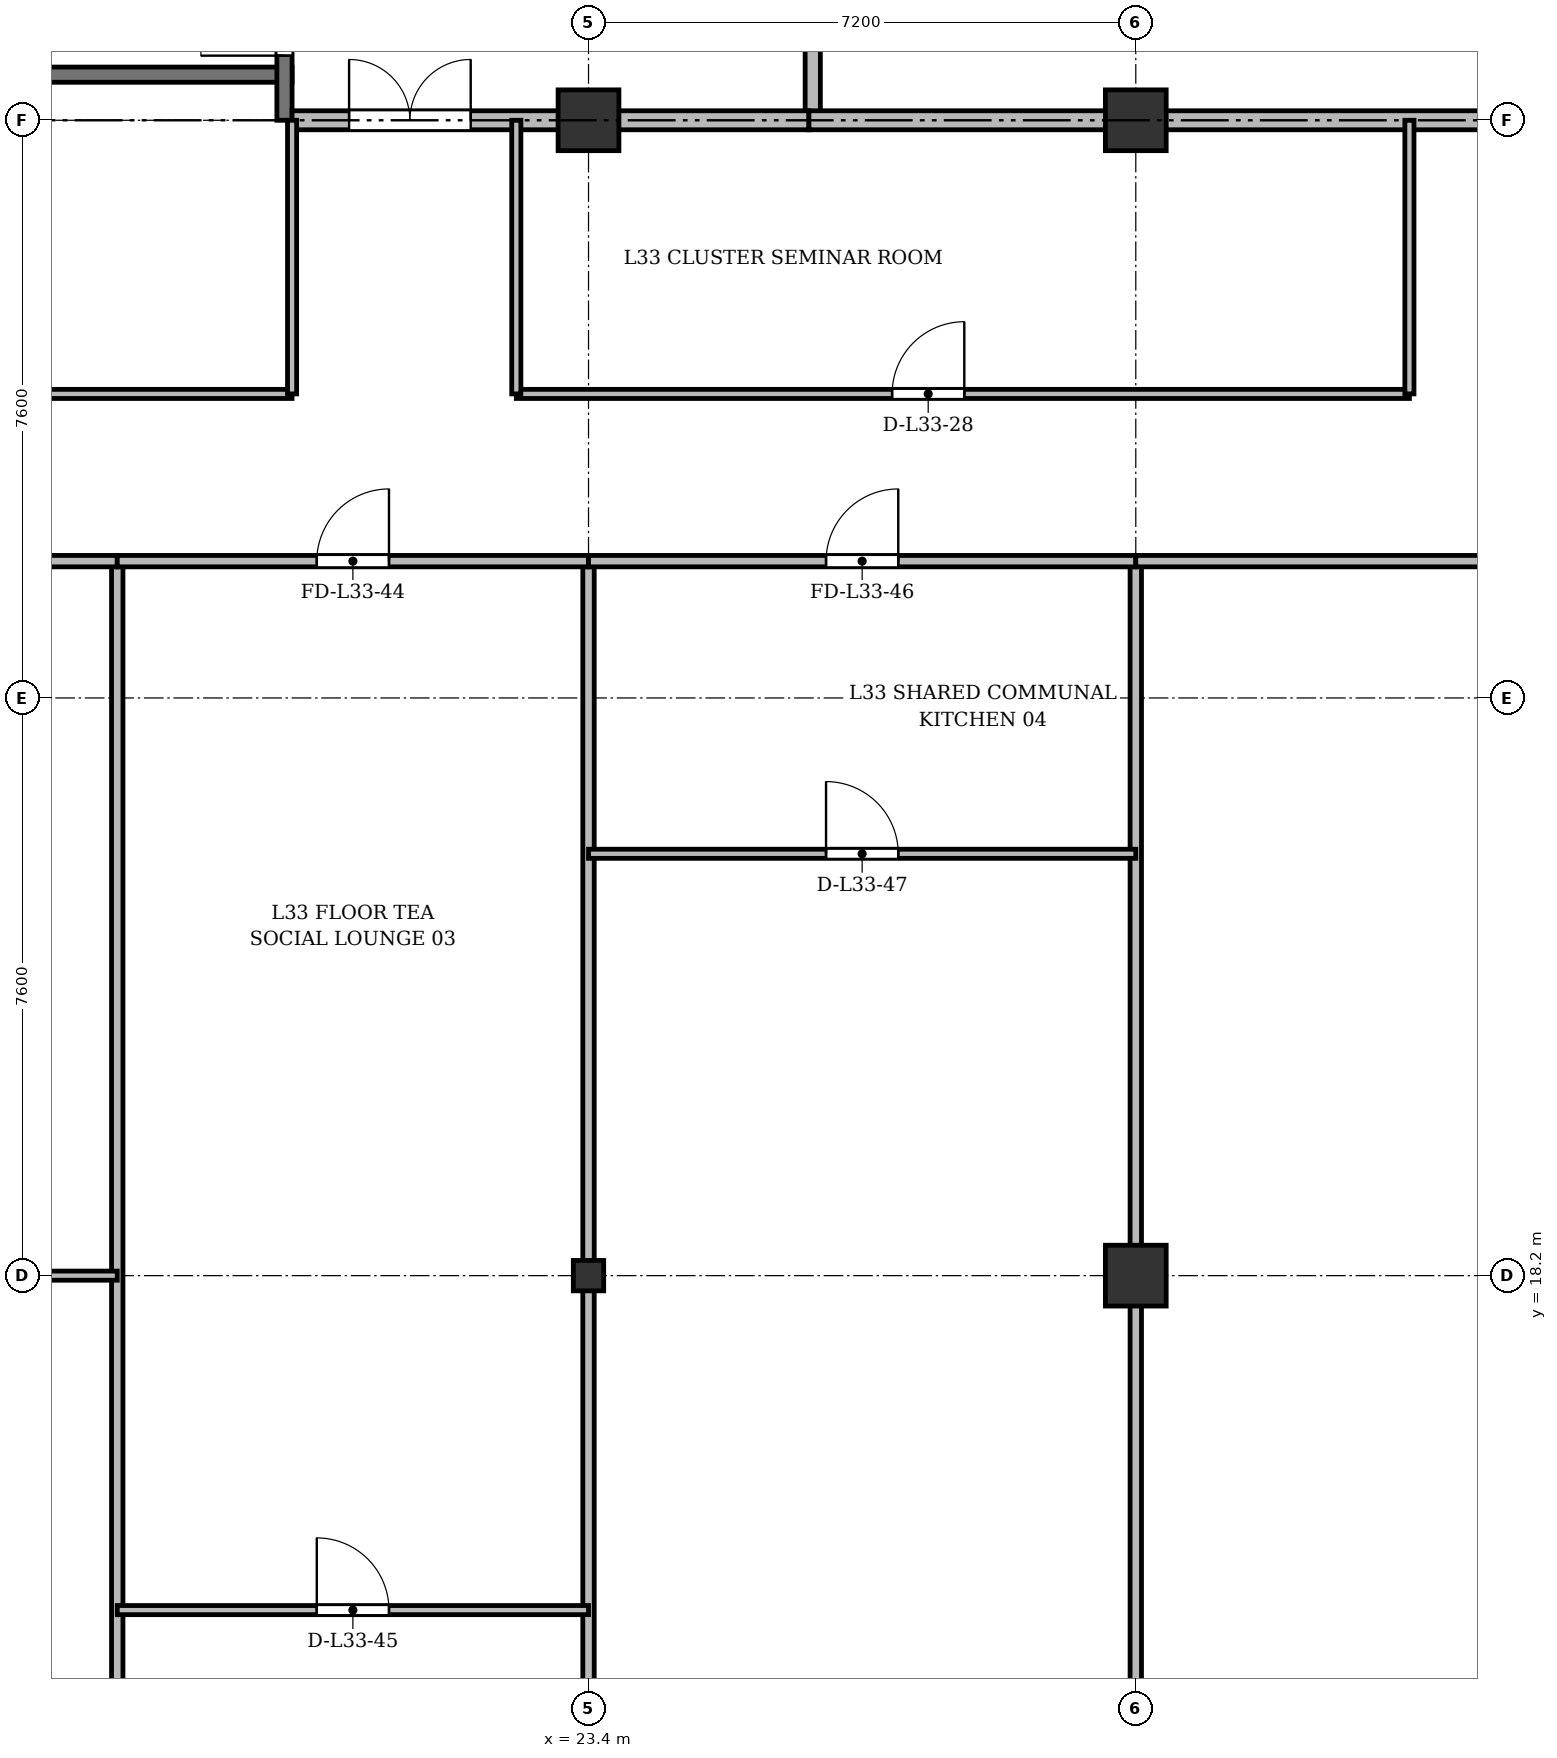
"""IFC4 building model, lengths in metres.
Left out: names, types, materials, properties, quantities, classifications, styles, units other than length and angle.
Written with IfcOpenShell. Run it as: python <this file> out.ifc"""

import sys

from ifc_helpers import new_model, si_unit, direction, frame, frame_2d, origin, origin_2d, place, context, subcontext, project, spatial, rectangle, i_section, extrude, source, transform, mapped, element, fill, save


model = new_model("IFC4")
c1 = context("Model", 3, precision=1e-05, world=origin(), true_north=direction((0.0, 1.0)))
c2 = subcontext(c1, "Body", "Model", "MODEL_VIEW")
j1 = project(units=[si_unit("LENGTHUNIT", "METRE"), si_unit("PLANEANGLEUNIT", "RADIAN")], contexts=[c1])
p1 = place(None, origin())
s1 = spatial("IfcSite", under=j1, at=p1, CompositionType="ELEMENT")
p2 = place(p1, origin())
s2 = spatial("IfcBuilding", under=s1, at=p2, CompositionType="ELEMENT")
p3 = place(p2, frame((0.0, 0.0, 128.5)))
s3 = spatial("IfcBuildingStorey", under=s2, at=p3, CompositionType="ELEMENT", Elevation=128.5)
m1 = source(origin(), c2, "Body", "SweptSolid", [
    extrude(i_section(OverallWidth=0.4, OverallDepth=0.4, WebThickness=0.022, FlangeThickness=0.035, at=origin_2d()), origin(), (0.0, 0.0, 1.0), 3.6),
])
p4 = place(p3, frame((23.4, 18.2, 0.0), z_axis=(0.0, 0.0, 1.0), x_axis=(1.0, 0.0, 0.0)))
e1 = element("IfcColumn", 1, at=p4, inside=s3, PredefinedType="COLUMN", context=c2, shape_type="MappedRepresentation", body=[
    mapped(m1, transform((0.0, 0.0, 0.0), x_axis=(1.0, 0.0, 0.0), y_axis=(0.0, 1.0, 0.0), z_axis=(0.0, 0.0, 1.0), scale=1.0)),
])
m2 = source(origin(), c2, "Body", "SweptSolid", [
    extrude(rectangle(XDim=0.8, YDim=0.8, at=origin_2d()), origin(), (0.0, 0.0, 1.0), 3.6),
])
for number, where, z_axis, x_axis in (
    (2, (23.4, 33.4, 0.0), (0.0, 0.0, 1.0), (1.0, 0.0, 0.0)),
    (3, (30.6, 18.2, 0.0), (0.0, 0.0, 1.0), (1.0, 0.0, 0.0)),
    (4, (30.6, 33.4, 0.0), (0.0, 0.0, 1.0), (1.0, 0.0, 0.0)),
):
    element("IfcColumn", number, at=place(p3, frame(where, z_axis=z_axis, x_axis=x_axis)), inside=s3, PredefinedType="COLUMN", context=c2, shape_type="MappedRepresentation", body=[
        mapped(m2, transform((0.0, 0.0, 0.0), x_axis=(1.0, 0.0, 0.0), y_axis=(0.0, 1.0, 0.0), z_axis=(0.0, 0.0, 1.0), scale=1.0)),
    ])
p5 = place(p3, frame((16.1, 34.0, 0.0), z_axis=(0.0, 0.0, 1.0), x_axis=(1.0, 0.0, 0.0)))
e5 = element("IfcWall", 5, at=p5, inside=s3, PredefinedType="SHEAR", context=c2, shape_type="SweptSolid", body=[
    extrude(rectangle(XDim=3.4, YDim=0.2, at=frame_2d((1.7, 0.0))), origin(), (0.0, 0.0, 1.0), 3.22),
])
p6 = place(p3, frame((19.4, 33.4, 0.0), z_axis=(0.0, 0.0, 1.0), x_axis=(0.0, 1.0, 0.0)))
e6 = element("IfcWall", 6, at=p6, inside=s3, PredefinedType="SHEAR", context=c2, shape_type="SweptSolid", body=[
    extrude(rectangle(XDim=11.1, YDim=0.2, at=frame_2d((5.55, 0.0))), origin(), (0.0, 0.0, 1.0), 3.22),
])
p7 = place(p6, frame((0.85, 0.0, 0.0)))
e7 = element("IfcOpeningElement", 7, at=p7, cuts=e6, PredefinedType="OPENING", context=c2, shape_type="SweptSolid", body=[
    extrude(rectangle(XDim=1.1, YDim=2.15, at=frame_2d((0.55, 1.075))), frame((0.0, 0.11, 0.0), z_axis=(0.0, -1.0, 0.0), x_axis=(1.0, 0.0, 0.0)), (0.0, 0.0, 1.0), 0.22),
])
p8 = place(p3, frame((26.35, 33.4, 0.0), z_axis=(0.0, 0.0, 1.0), x_axis=(0.0, 1.0, 0.0)))
e8 = element("IfcWall", 8, at=p8, inside=s3, PredefinedType="SOLIDWALL", context=c2, shape_type="SweptSolid", body=[
    extrude(rectangle(XDim=11.3, YDim=0.2, at=frame_2d((5.65, 0.0))), origin(), (0.0, 0.0, 1.0), 2.632),
])
p9 = place(p3, frame((19.5, 33.4, 0.0), z_axis=(0.0, 0.0, 1.0), x_axis=(1.0, 0.0, 0.0)))
e9 = element("IfcWall", 9, at=p9, inside=s3, PredefinedType="PARTITIONING", context=c2, shape_type="SweptSolid", body=[
    extrude(rectangle(XDim=6.8, YDim=0.25, at=frame_2d((3.4, 0.0))), origin(), (0.0, 0.0, 1.0), 2.632),
])
p10 = place(p9, frame((0.75, 0.0, 0.0)))
e10 = element("IfcOpeningElement", 10, at=p10, cuts=e9, PredefinedType="OPENING", context=c2, shape_type="SweptSolid", body=[
    extrude(rectangle(XDim=1.6, YDim=2.2, at=frame_2d((0.8, 1.1))), frame((0.0, 0.135, 0.0), z_axis=(0.0, -1.0, 0.0), x_axis=(1.0, 0.0, 0.0)), (0.0, 0.0, 1.0), 0.27),
])
p11 = place(p3, frame((26.3, 33.4, 0.0), z_axis=(0.0, 0.0, 1.0), x_axis=(1.0, 0.0, 0.0)))
e11 = element("IfcWall", 11, at=p11, inside=s3, PredefinedType="PARTITIONING", context=c2, shape_type="SweptSolid", body=[
    extrude(rectangle(XDim=20.85, YDim=0.25, at=frame_2d((10.425, 0.0))), origin(), (0.0, 0.0, 1.0), 2.632),
])
p12 = place(p11, frame((9.2, 0.0, 0.0)))
e12 = element("IfcOpeningElement", 12, at=p12, cuts=e11, PredefinedType="OPENING", context=c2, shape_type="SweptSolid", body=[
    extrude(rectangle(XDim=1.6, YDim=2.2, at=frame_2d((0.8, 1.1))), frame((0.0, 0.135, 0.0), z_axis=(0.0, -1.0, 0.0), x_axis=(1.0, 0.0, 0.0)), (0.0, 0.0, 1.0), 0.27),
])
p13 = place(p3, frame((4.75, 29.8, 0.0), z_axis=(0.0, 0.0, 1.0), x_axis=(1.0, 0.0, 0.0)))
e13 = element("IfcWall", 13, at=p13, inside=s3, PredefinedType="PARTITIONING", context=c2, shape_type="SweptSolid", body=[
    extrude(rectangle(XDim=14.75, YDim=0.12, at=frame_2d((7.375, 0.0))), origin(), (0.0, 0.0, 1.0), 2.72),
])
p14 = place(p13, frame((6.9, 0.0, 0.0)))
e14 = element("IfcOpeningElement", 14, at=p14, cuts=e13, PredefinedType="OPENING", context=c2, shape_type="SweptSolid", body=[
    extrude(rectangle(XDim=0.95, YDim=2.15, at=frame_2d((0.475, 1.075))), frame((0.0, 0.07, 0.0), z_axis=(0.0, -1.0, 0.0), x_axis=(1.0, 0.0, 0.0)), (0.0, 0.0, 1.0), 0.14),
])
p15 = place(p3, frame((22.45, 29.8, 0.0), z_axis=(0.0, 0.0, 1.0), x_axis=(1.0, 0.0, 0.0)))
e15 = element("IfcWall", 15, at=p15, inside=s3, PredefinedType="PARTITIONING", context=c2, shape_type="SweptSolid", body=[
    extrude(rectangle(XDim=11.75, YDim=0.12, at=frame_2d((5.875, 0.0))), origin(), (0.0, 0.0, 1.0), 2.72),
])
p16 = place(p15, frame((4.944, 0.0, 0.0)))
e16 = element("IfcOpeningElement", 16, at=p16, cuts=e15, PredefinedType="OPENING", context=c2, shape_type="SweptSolid", body=[
    extrude(rectangle(XDim=0.95, YDim=2.15, at=frame_2d((0.475, 1.075))), frame((0.0, 0.07, 0.0), z_axis=(0.0, -1.0, 0.0), x_axis=(1.0, 0.0, 0.0)), (0.0, 0.0, 1.0), 0.14),
])
for number, where, z_axis, x_axis in (
    (17, (19.5, 29.8, 0.0), (0.0, 0.0, 1.0), (0.0, 1.0, 0.0)),
    (18, (22.45, 29.8, 0.0), (0.0, 0.0, 1.0), (0.0, 1.0, 0.0)),
    (19, (34.2, 29.8, 0.0), (0.0, 0.0, 1.0), (0.0, 1.0, 0.0)),
):
    element("IfcWall", number, at=place(p3, frame(where, z_axis=z_axis, x_axis=x_axis)), inside=s3, PredefinedType="PARTITIONING", context=c2, shape_type="SweptSolid", body=[
        extrude(rectangle(XDim=3.6, YDim=0.12, at=frame_2d((1.8, 0.0))), origin(), (0.0, 0.0, 1.0), 2.632),
    ])
p17 = place(p3, frame((17.2, 3.145, 0.0), z_axis=(0.0, 0.0, 1.0), x_axis=(0.0, 1.0, 0.0)))
e20 = element("IfcWall", 20, at=p17, inside=s3, PredefinedType="PARTITIONING", context=c2, shape_type="SweptSolid", body=[
    extrude(rectangle(XDim=24.455, YDim=0.15, at=frame_2d((12.228, 0.0))), origin(), (0.0, 0.0, 1.0), 2.632),
])
for number, where, z_axis, x_axis in (
    (21, (23.4, 3.145, 0.0), (0.0, 0.0, 1.0), (0.0, 1.0, 0.0)),
    (22, (30.6, 3.145, 0.0), (0.0, 0.0, 1.0), (0.0, 1.0, 0.0)),
):
    element("IfcWall", number, at=place(p3, frame(where, z_axis=z_axis, x_axis=x_axis)), inside=s3, PredefinedType="PARTITIONING", context=c2, shape_type="SweptSolid", body=[
        extrude(rectangle(XDim=24.455, YDim=0.15, at=frame_2d((12.228, 0.0))), origin(), (0.0, 0.0, 1.0), 2.72),
    ])
p18 = place(p3, frame((10.6, 27.6, 0.0), z_axis=(0.0, 0.0, 1.0), x_axis=(1.0, 0.0, 0.0)))
e23 = element("IfcWall", 23, at=p18, inside=s3, PredefinedType="PARTITIONING", context=c2, shape_type="SweptSolid", body=[
    extrude(rectangle(XDim=6.6, YDim=0.15, at=frame_2d((3.3, 0.0))), origin(), (0.0, 0.0, 1.0), 2.72),
])
p19 = place(p18, frame((2.734, 0.0, 0.0)))
e24 = element("IfcOpeningElement", 24, at=p19, cuts=e23, PredefinedType="OPENING", context=c2, shape_type="SweptSolid", body=[
    extrude(rectangle(XDim=0.95, YDim=2.15, at=frame_2d((0.475, 1.075))), frame((0.0, 0.085, 0.0), z_axis=(0.0, -1.0, 0.0), x_axis=(1.0, 0.0, 0.0)), (0.0, 0.0, 1.0), 0.17),
])
p20 = place(p3, frame((10.6, 18.2, 0.0), z_axis=(0.0, 0.0, 1.0), x_axis=(1.0, 0.0, 0.0)))
e25 = element("IfcWall", 25, at=p20, inside=s3, PredefinedType="PARTITIONING", context=c2, shape_type="SweptSolid", body=[
    extrude(rectangle(XDim=6.6, YDim=0.12, at=frame_2d((3.3, 0.0))), origin(), (0.0, 0.0, 1.0), 2.632),
])
p21 = place(p20, frame((2.734, 0.0, 0.0)))
e26 = element("IfcOpeningElement", 26, at=p21, cuts=e25, PredefinedType="OPENING", context=c2, shape_type="SweptSolid", body=[
    extrude(rectangle(XDim=0.95, YDim=2.15, at=frame_2d((0.475, 1.075))), frame((0.0, 0.07, 0.0), z_axis=(0.0, -1.0, 0.0), x_axis=(1.0, 0.0, 0.0)), (0.0, 0.0, 1.0), 0.14),
])
p22 = place(p3, frame((17.2, 27.6, 0.0), z_axis=(0.0, 0.0, 1.0), x_axis=(1.0, 0.0, 0.0)))
e27 = element("IfcWall", 27, at=p22, inside=s3, PredefinedType="PARTITIONING", context=c2, shape_type="SweptSolid", body=[
    extrude(rectangle(XDim=6.2, YDim=0.15, at=frame_2d((3.1, 0.0))), origin(), (0.0, 0.0, 1.0), 2.72),
])
p23 = place(p22, frame((2.625, 0.0, 0.0)))
e28 = element("IfcOpeningElement", 28, at=p23, cuts=e27, PredefinedType="OPENING", context=c2, shape_type="SweptSolid", body=[
    extrude(rectangle(XDim=0.95, YDim=2.15, at=frame_2d((0.475, 1.075))), frame((0.0, 0.085, 0.0), z_axis=(0.0, -1.0, 0.0), x_axis=(1.0, 0.0, 0.0)), (0.0, 0.0, 1.0), 0.17),
])
p24 = place(p3, frame((17.2, 13.8, 0.0), z_axis=(0.0, 0.0, 1.0), x_axis=(1.0, 0.0, 0.0)))
e29 = element("IfcWall", 29, at=p24, inside=s3, PredefinedType="PARTITIONING", context=c2, shape_type="SweptSolid", body=[
    extrude(rectangle(XDim=6.2, YDim=0.12, at=frame_2d((3.1, 0.0))), origin(), (0.0, 0.0, 1.0), 2.72),
])
p25 = place(p24, frame((2.625, 0.0, 0.0)))
e30 = element("IfcOpeningElement", 30, at=p25, cuts=e29, PredefinedType="OPENING", context=c2, shape_type="SweptSolid", body=[
    extrude(rectangle(XDim=0.95, YDim=2.15, at=frame_2d((0.475, 1.075))), frame((0.0, 0.07, 0.0), z_axis=(0.0, -1.0, 0.0), x_axis=(1.0, 0.0, 0.0)), (0.0, 0.0, 1.0), 0.14),
])
p26 = place(p3, frame((23.4, 27.6, 0.0), z_axis=(0.0, 0.0, 1.0), x_axis=(1.0, 0.0, 0.0)))
e31 = element("IfcWall", 31, at=p26, inside=s3, PredefinedType="PARTITIONING", context=c2, shape_type="SweptSolid", body=[
    extrude(rectangle(XDim=7.2, YDim=0.15, at=frame_2d((3.6, 0.0))), origin(), (0.0, 0.0, 1.0), 2.72),
])
p27 = place(p26, frame((3.125, 0.0, 0.0)))
e32 = element("IfcOpeningElement", 32, at=p27, cuts=e31, PredefinedType="OPENING", context=c2, shape_type="SweptSolid", body=[
    extrude(rectangle(XDim=0.95, YDim=2.15, at=frame_2d((0.475, 1.075))), frame((0.0, 0.085, 0.0), z_axis=(0.0, -1.0, 0.0), x_axis=(1.0, 0.0, 0.0)), (0.0, 0.0, 1.0), 0.17),
])
p28 = place(p3, frame((23.4, 23.75, 0.0), z_axis=(0.0, 0.0, 1.0), x_axis=(1.0, 0.0, 0.0)))
e33 = element("IfcWall", 33, at=p28, inside=s3, PredefinedType="PARTITIONING", context=c2, shape_type="SweptSolid", body=[
    extrude(rectangle(XDim=7.2, YDim=0.12, at=frame_2d((3.6, 0.0))), origin(), (0.0, 0.0, 1.0), 2.72),
])
p29 = place(p28, frame((3.125, 0.0, 0.0)))
e34 = element("IfcOpeningElement", 34, at=p29, cuts=e33, PredefinedType="OPENING", context=c2, shape_type="SweptSolid", body=[
    extrude(rectangle(XDim=0.95, YDim=2.15, at=frame_2d((0.475, 1.075))), frame((0.0, 0.07, 0.0), z_axis=(0.0, -1.0, 0.0), x_axis=(1.0, 0.0, 0.0)), (0.0, 0.0, 1.0), 0.14),
])
p30 = place(p3, frame((30.6, 27.6, 0.0), z_axis=(0.0, 0.0, 1.0), x_axis=(1.0, 0.0, 0.0)))
e35 = element("IfcWall", 35, at=p30, inside=s3, PredefinedType="PARTITIONING", context=c2, shape_type="SweptSolid", body=[
    extrude(rectangle(XDim=13.2, YDim=0.15, at=frame_2d((6.6, 0.0))), origin(), (0.0, 0.0, 1.0), 2.72),
])
p31 = place(p30, frame((5.8, 0.0, 0.0)))
e36 = element("IfcOpeningElement", 36, at=p31, cuts=e35, PredefinedType="OPENING", context=c2, shape_type="SweptSolid", body=[
    extrude(rectangle(XDim=1.6, YDim=2.2, at=frame_2d((0.8, 1.1))), frame((0.0, 0.085, 0.0), z_axis=(0.0, -1.0, 0.0), x_axis=(1.0, 0.0, 0.0)), (0.0, 0.0, 1.0), 0.17),
])
m3 = source(origin(), c2, "Body", "SweptSolid", [
    extrude(rectangle(XDim=1.1, YDim=2.15, at=frame_2d((0.55, 1.075))), frame((0.0, 0.025, 0.0), z_axis=(0.0, -1.0, 0.0), x_axis=(1.0, 0.0, 0.0)), (0.0, 0.0, 1.0), 0.05),
])
p32 = place(p7, origin())
e37 = element("IfcDoor", 37, at=p32, inside=s3, OperationType="SINGLE_SWING_LEFT", PredefinedType="DOOR", context=c2, shape_type="MappedRepresentation", body=[
    mapped(m3, transform((0.0, 0.0, 0.0), x_axis=(1.0, 0.0, 0.0), y_axis=(0.0, 1.0, 0.0), z_axis=(0.0, 0.0, 1.0), scale=1.0)),
])
fill(e7, e37)
m4 = source(origin(), c2, "Body", "SweptSolid", [
    extrude(rectangle(XDim=1.6, YDim=2.2, at=frame_2d((0.8, 1.1))), frame((0.0, 0.025, 0.0), z_axis=(0.0, -1.0, 0.0), x_axis=(1.0, 0.0, 0.0)), (0.0, 0.0, 1.0), 0.05),
])
p33 = place(p10, origin())
e38 = element("IfcDoor", 38, at=p33, inside=s3, OperationType="DOUBLE_DOOR_SINGLE_SWING", PredefinedType="DOOR", context=c2, shape_type="MappedRepresentation", body=[
    mapped(m4, transform((0.0, 0.0, 0.0), x_axis=(1.0, 0.0, 0.0), y_axis=(0.0, 1.0, 0.0), z_axis=(0.0, 0.0, 1.0), scale=1.0)),
])
fill(e10, e38)
m5 = source(origin(), c2, "Body", "SweptSolid", [
    extrude(rectangle(XDim=0.95, YDim=2.15, at=frame_2d((0.475, 1.075))), frame((0.0, 0.025, 0.0), z_axis=(0.0, -1.0, 0.0), x_axis=(1.0, 0.0, 0.0)), (0.0, 0.0, 1.0), 0.05),
])
p34 = place(p16, origin())
e39 = element("IfcDoor", 39, at=p34, inside=s3, OperationType="SINGLE_SWING_RIGHT", PredefinedType="DOOR", context=c2, shape_type="MappedRepresentation", body=[
    mapped(m5, transform((0.0, 0.0, 0.0), x_axis=(1.0, 0.0, 0.0), y_axis=(0.0, 1.0, 0.0), z_axis=(0.0, 0.0, 1.0), scale=1.0)),
])
fill(e16, e39)
p35 = place(p23, origin())
e40 = element("IfcDoor", 40, at=p35, inside=s3, OperationType="SINGLE_SWING_RIGHT", PredefinedType="DOOR", context=c2, shape_type="MappedRepresentation", body=[
    mapped(m5, transform((0.0, 0.0, 0.0), x_axis=(1.0, 0.0, 0.0), y_axis=(0.0, 1.0, 0.0), z_axis=(0.0, 0.0, 1.0), scale=1.0)),
])
fill(e28, e40)
p36 = place(p25, origin())
e41 = element("IfcDoor", 41, at=p36, inside=s3, OperationType="SINGLE_SWING_LEFT", PredefinedType="DOOR", context=c2, shape_type="MappedRepresentation", body=[
    mapped(m5, transform((0.0, 0.0, 0.0), x_axis=(1.0, 0.0, 0.0), y_axis=(0.0, 1.0, 0.0), z_axis=(0.0, 0.0, 1.0), scale=1.0)),
])
fill(e30, e41)
p37 = place(p27, origin())
e42 = element("IfcDoor", 42, at=p37, inside=s3, OperationType="SINGLE_SWING_RIGHT", PredefinedType="DOOR", context=c2, shape_type="MappedRepresentation", body=[
    mapped(m5, transform((0.0, 0.0, 0.0), x_axis=(1.0, 0.0, 0.0), y_axis=(0.0, 1.0, 0.0), z_axis=(0.0, 0.0, 1.0), scale=1.0)),
])
fill(e32, e42)
p38 = place(p29, origin())
e43 = element("IfcDoor", 43, at=p38, inside=s3, OperationType="SINGLE_SWING_LEFT", PredefinedType="DOOR", context=c2, shape_type="MappedRepresentation", body=[
    mapped(m5, transform((0.0, 0.0, 0.0), x_axis=(1.0, 0.0, 0.0), y_axis=(0.0, 1.0, 0.0), z_axis=(0.0, 0.0, 1.0), scale=1.0)),
])
fill(e34, e43)
save(model, sys.argv[1])
